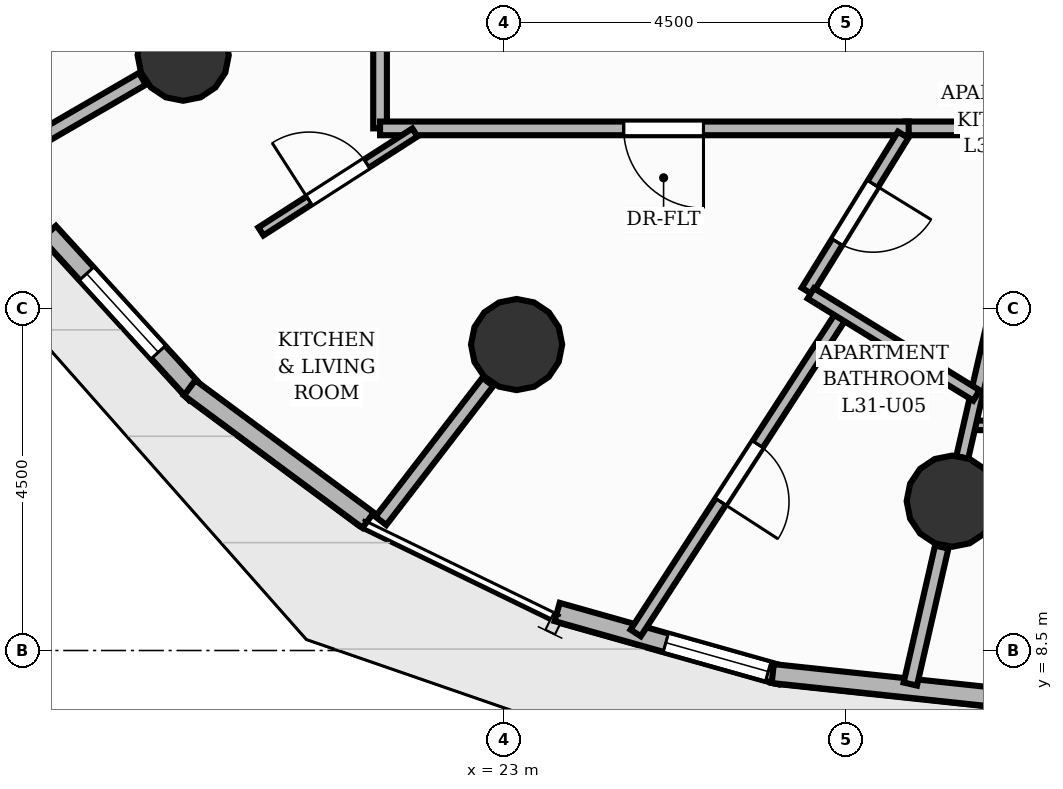
"""IFC4 building model, lengths in metres.
Left out: names, types, materials, properties, quantities, classifications, styles, units other than length and angle.
Written with IfcOpenShell. Run it as: python <this file> out.ifc"""

import sys

from ifc_helpers import new_model, si_unit, direction, frame, frame_2d, origin, origin_2d, place, context, subcontext, project, spatial, rectangle, circle, extrude, element, fill, save


model = new_model("IFC4")
c1 = context("Model", 3, precision=1e-05, world=origin(), true_north=direction((0.0, 1.0)))
c2 = subcontext(c1, "Body", "Model", "MODEL_VIEW")
j1 = project(units=[si_unit("LENGTHUNIT", "METRE"), si_unit("PLANEANGLEUNIT", "RADIAN")], contexts=[c1])
p1 = place(None, origin())
s1 = spatial("IfcSite", under=j1, at=p1, CompositionType="ELEMENT")
p2 = place(p1, origin())
s2 = spatial("IfcBuilding", under=s1, at=p2, CompositionType="ELEMENT")
p3 = place(p2, frame((0.0, 0.0, 106.08)))
s3 = spatial("IfcBuildingStorey", under=s2, at=p3, CompositionType="ELEMENT", Elevation=106.08)
for number, where, z_axis, x_axis in (
    (1, (18.78, 16.333, 0.0), (0.0, 0.0, 1.0), (1.0, 0.0, 0.0)),
    (2, (23.167, 12.526, 0.0), (0.0, 0.0, 1.0), (1.0, 0.0, 0.0)),
    (3, (28.898, 10.465, 0.0), (0.0, 0.0, 1.0), (1.0, 0.0, 0.0)),
):
    element("IfcColumn", number, at=place(p3, frame(where, z_axis=z_axis, x_axis=x_axis)), inside=s3, PredefinedType="COLUMN", context=c2, shape_type="SweptSolid", body=[
        extrude(circle(Radius=0.6, at=origin_2d()), origin(), (0.0, 0.0, 1.0), 3.2),
    ])
p4 = place(p3, frame((18.949, 11.879, 0.0), z_axis=(0.0, 0.0, 1.0), x_axis=(-0.673691100196, 0.739013059098, 0.0)))
e4 = element("IfcWall", 4, at=p4, inside=s3, PredefinedType="SOLIDWALL", context=c2, shape_type="SweptSolid", body=[
    extrude(rectangle(XDim=2.874, YDim=0.25, at=frame_2d((1.437, 0.0))), origin(), (0.0, 0.0, 1.0), 2.96),
])
p5 = place(p4, frame((0.737, 0.0, 0.85)))
e5 = element("IfcOpeningElement", 5, at=p5, cuts=e4, PredefinedType="OPENING", context=c2, shape_type="SweptSolid", body=[
    extrude(rectangle(XDim=1.4, YDim=1.55, at=frame_2d((0.7, 0.775))), frame((0.0, 0.135, 0.0), z_axis=(0.0, -1.0, 0.0), x_axis=(1.0, 0.0, 0.0)), (0.0, 0.0, 1.0), 0.27),
])
p6 = place(p3, frame((21.213, 10.215, 0.0), z_axis=(0.0, 0.0, 1.0), x_axis=(-0.803255279066, 0.595634918933, 0.0)))
e6 = element("IfcWall", 6, at=p6, inside=s3, PredefinedType="SOLIDWALL", context=c2, shape_type="SweptSolid", body=[
    extrude(rectangle(XDim=2.923, YDim=0.25, at=frame_2d((1.462, 0.0))), origin(), (0.0, 0.0, 1.0), 2.96),
])
p7 = place(p3, frame((26.646, 8.175, 0.0), z_axis=(0.0, 0.0, 1.0), x_axis=(-0.962391946781, 0.271664758059, 0.0)))
e7 = element("IfcWall", 7, at=p7, inside=s3, PredefinedType="SOLIDWALL", context=c2, shape_type="SweptSolid", body=[
    extrude(rectangle(XDim=3.061, YDim=0.25, at=frame_2d((1.531, 0.0))), origin(), (0.0, 0.0, 1.0), 2.96),
])
p8 = place(p7, frame((0.175, 0.0, 0.85)))
e8 = element("IfcOpeningElement", 8, at=p8, cuts=e7, PredefinedType="OPENING", context=c2, shape_type="SweptSolid", body=[
    extrude(rectangle(XDim=1.4, YDim=1.55, at=frame_2d((0.7, 0.775))), frame((0.0, 0.135, 0.0), z_axis=(0.0, -1.0, 0.0), x_axis=(1.0, 0.0, 0.0)), (0.0, 0.0, 1.0), 0.27),
])
p9 = place(p3, frame((29.65, 7.864, 0.0), z_axis=(0.0, 0.0, 1.0), x_axis=(-0.994353607356, 0.106117404502, 0.0)))
e9 = element("IfcWall", 9, at=p9, inside=s3, PredefinedType="SOLIDWALL", context=c2, shape_type="SweptSolid", body=[
    extrude(rectangle(XDim=3.131, YDim=0.25, at=frame_2d((1.565, 0.0))), origin(), (0.0, 0.0, 1.0), 2.96),
])
p10 = place(p3, frame((18.243, 16.022, 0.0), z_axis=(0.0, 0.0, 1.0), x_axis=(-0.865046864493, -0.501691062539, 0.0)))
e10 = element("IfcWall", 10, at=p10, inside=s3, PredefinedType="PARTITIONING", context=c2, shape_type="SweptSolid", body=[
    extrude(rectangle(XDim=2.028, YDim=0.18, at=frame_2d((1.014, 0.0))), origin(), (0.0, 0.0, 1.0), 2.26),
])
p11 = place(p3, frame((22.788, 12.034, 0.0), z_axis=(0.0, 0.0, 1.0), x_axis=(-0.610007255548, -0.792395827967, 0.0)))
e11 = element("IfcWall", 11, at=p11, inside=s3, PredefinedType="PARTITIONING", context=c2, shape_type="SweptSolid", body=[
    extrude(rectangle(XDim=2.308, YDim=0.18, at=frame_2d((1.154, 0.0))), origin(), (0.0, 0.0, 1.0), 2.26),
])
p12 = place(p3, frame((28.76, 9.861, 0.0), z_axis=(0.0, 0.0, 1.0), x_axis=(-0.2234127464, -0.974723932581, 0.0)))
e12 = element("IfcWall", 12, at=p12, inside=s3, PredefinedType="PARTITIONING", context=c2, shape_type="SweptSolid", body=[
    extrude(rectangle(XDim=1.849, YDim=0.18, at=frame_2d((0.924, 0.0))), origin(), (0.0, 0.0, 1.0), 2.26),
])
p13 = place(p3, frame((42.63, 15.37, 0.0), z_axis=(0.0, 0.0, 1.0), x_axis=(-1.0, 0.0, 0.0)))
e13 = element("IfcWall", 13, at=p13, inside=s3, PredefinedType="PARTITIONING", context=c2, shape_type="SweptSolid", body=[
    extrude(rectangle(XDim=14.346, YDim=0.18, at=frame_2d((7.173, 0.0))), origin(), (0.0, 0.0, 1.0), 2.955),
])
p14 = place(p13, frame((6.615, 0.0, 0.0)))
e14 = element("IfcOpeningElement", 14, at=p14, cuts=e13, PredefinedType="OPENING", context=c2, shape_type="SweptSolid", body=[
    extrude(rectangle(XDim=1.05, YDim=2.15, at=frame_2d((0.525, 1.075))), frame((0.0, 0.1, 0.0), z_axis=(0.0, -1.0, 0.0), x_axis=(1.0, 0.0, 0.0)), (0.0, 0.0, 1.0), 0.2),
])
p15 = place(p3, frame((21.37, 15.37, 0.0), z_axis=(0.0, 0.0, 1.0), x_axis=(0.0, 1.0, 0.0)))
e15 = element("IfcWall", 15, at=p15, inside=s3, PredefinedType="PARTITIONING", context=c2, shape_type="SweptSolid", body=[
    extrude(rectangle(XDim=17.26, YDim=0.18, at=frame_2d((8.63, 0.0))), origin(), (0.0, 0.0, 1.0), 2.955),
])
p16 = place(p15, frame((13.794, 0.0, 0.0)))
e16 = element("IfcOpeningElement", 16, at=p16, cuts=e15, PredefinedType="OPENING", context=c2, shape_type="SweptSolid", body=[
    extrude(rectangle(XDim=1.05, YDim=2.15, at=frame_2d((0.525, 1.075))), frame((0.0, 0.1, 0.0), z_axis=(0.0, -1.0, 0.0), x_axis=(1.0, 0.0, 0.0)), (0.0, 0.0, 1.0), 0.2),
])
p17 = place(p3, frame((28.325, 15.37, 0.0), z_axis=(0.0, 0.0, 1.0), x_axis=(-1.0, 0.0, 0.0)))
e17 = element("IfcWall", 17, at=p17, inside=s3, PredefinedType="PARTITIONING", context=c2, shape_type="SweptSolid", body=[
    extrude(rectangle(XDim=6.955, YDim=0.18, at=frame_2d((3.478, 0.0))), origin(), (0.0, 0.0, 1.0), 2.955),
])
p18 = place(p17, frame((2.7, 0.0, 0.0)))
e18 = element("IfcOpeningElement", 18, at=p18, cuts=e17, PredefinedType="OPENING", context=c2, shape_type="SweptSolid", body=[
    extrude(rectangle(XDim=1.05, YDim=2.15, at=frame_2d((0.525, 1.075))), frame((0.0, 0.1, 0.0), z_axis=(0.0, -1.0, 0.0), x_axis=(1.0, 0.0, 0.0)), (0.0, 0.0, 1.0), 0.2),
])
p19 = place(p3, frame((34.368, 11.384, 0.0), z_axis=(0.0, 0.0, 1.0), x_axis=(-0.999882579861, 0.015324049414, 0.0)))
e19 = element("IfcWall", 19, at=p19, inside=s3, PredefinedType="PARTITIONING", context=c2, shape_type="SweptSolid", body=[
    extrude(rectangle(XDim=5.242, YDim=0.125, at=frame_2d((2.621, 0.0))), origin(), (0.0, 0.0, 1.0), 2.955),
])
p20 = place(p19, frame((2.171, 0.0, 0.0)))
e20 = element("IfcOpeningElement", 20, at=p20, cuts=e19, PredefinedType="OPENING", context=c2, shape_type="SweptSolid", body=[
    extrude(rectangle(XDim=0.9, YDim=2.1, at=frame_2d((0.45, 1.05))), frame((0.0, 0.073, 0.0), z_axis=(0.0, -1.0, 0.0), x_axis=(1.0, 0.0, 0.0)), (0.0, 0.0, 1.0), 0.145),
])
p21 = place(p3, frame((29.03, 11.041, 0.0), z_axis=(0.0, 0.0, 1.0), x_axis=(0.223478419757, 0.974708877513, 0.0)))
e21 = element("IfcWall", 21, at=p21, inside=s3, PredefinedType="PLUMBINGWALL", context=c2, shape_type="SweptSolid", body=[
    extrude(rectangle(XDim=4.442, YDim=0.16, at=frame_2d((2.221, 0.0))), origin(), (0.0, 0.0, 1.0), 2.26),
])
p22 = place(p3, frame((27.458, 12.94, 0.0), z_axis=(0.0, 0.0, 1.0), x_axis=(-0.543424886613, -0.839457796801, 0.0)))
e22 = element("IfcWall", 22, at=p22, inside=s3, PredefinedType="PLUMBINGWALL", context=c2, shape_type="SweptSolid", body=[
    extrude(rectangle(XDim=5.014, YDim=0.16, at=frame_2d((2.507, 0.0))), origin(), (0.0, 0.0, 1.0), 2.641),
])
p23 = place(p22, frame((2.057, 0.0, 0.0)))
e23 = element("IfcOpeningElement", 23, at=p23, cuts=e22, PredefinedType="OPENING", context=c2, shape_type="SweptSolid", body=[
    extrude(rectangle(XDim=0.9, YDim=2.1, at=frame_2d((0.45, 1.05))), frame((0.0, 0.09, 0.0), z_axis=(0.0, -1.0, 0.0), x_axis=(1.0, 0.0, 0.0)), (0.0, 0.0, 1.0), 0.18),
])
p24 = place(p3, frame((19.802, 14.014, 0.0), z_axis=(0.0, 0.0, 1.0), x_axis=(0.841349696578, 0.540491154477, 0.0)))
e24 = element("IfcWall", 24, at=p24, inside=s3, PredefinedType="PARTITIONING", context=c2, shape_type="SweptSolid", body=[
    extrude(rectangle(XDim=2.408, YDim=0.125, at=frame_2d((1.204, 0.0))), origin(), (0.0, 0.0, 1.0), 2.955),
])
p25 = place(p24, frame((0.754, 0.0, 0.0)))
e25 = element("IfcOpeningElement", 25, at=p25, cuts=e24, PredefinedType="OPENING", context=c2, shape_type="SweptSolid", body=[
    extrude(rectangle(XDim=0.9, YDim=2.1, at=frame_2d((0.45, 1.05))), frame((0.0, 0.073, 0.0), z_axis=(0.0, -1.0, 0.0), x_axis=(1.0, 0.0, 0.0)), (0.0, 0.0, 1.0), 0.145),
])
p26 = place(p3, frame((28.253, 15.285, 0.0), z_axis=(0.0, 0.0, 1.0), x_axis=(-0.524605293124, -0.851345574033, 0.0)))
e26 = element("IfcWall", 26, at=p26, inside=s3, PredefinedType="PLUMBINGWALL", context=c2, shape_type="SweptSolid", body=[
    extrude(rectangle(XDim=2.414, YDim=0.16, at=frame_2d((1.207, 0.0))), origin(), (0.0, 0.0, 1.0), 2.955),
])
p27 = place(p26, frame((0.757, 0.0, 0.0)))
e27 = element("IfcOpeningElement", 27, at=p27, cuts=e26, PredefinedType="OPENING", context=c2, shape_type="SweptSolid", body=[
    extrude(rectangle(XDim=0.9, YDim=2.1, at=frame_2d((0.45, 1.05))), frame((0.0, 0.09, 0.0), z_axis=(0.0, -1.0, 0.0), x_axis=(1.0, 0.0, 0.0)), (0.0, 0.0, 1.0), 0.18),
])
p28 = place(p3, frame((27.038, 13.199, 0.0), z_axis=(0.0, 0.0, 1.0), x_axis=(0.851314293413, -0.524656052887, 0.0)))
e28 = element("IfcWall", 28, at=p28, inside=s3, PredefinedType="PLUMBINGWALL", context=c2, shape_type="SweptSolid", body=[
    extrude(rectangle(XDim=2.56, YDim=0.16, at=frame_2d((1.28, 0.0))), origin(), (0.0, 0.0, 1.0), 2.955),
])
p29 = place(p5, origin())
e29 = element("IfcWindow", 29, at=p29, inside=s3, PartitioningType="SINGLE_PANEL", PredefinedType="WINDOW", context=c2, shape_type="SweptSolid", body=[
    extrude(rectangle(XDim=1.4, YDim=1.55, at=frame_2d((0.7, 0.775))), frame((0.0, 0.03, 0.0), z_axis=(0.0, -1.0, 0.0), x_axis=(1.0, 0.0, 0.0)), (0.0, 0.0, 1.0), 0.06),
])
fill(e5, e29)
p30 = place(p8, origin())
e30 = element("IfcWindow", 30, at=p30, inside=s3, PartitioningType="SINGLE_PANEL", PredefinedType="WINDOW", context=c2, shape_type="SweptSolid", body=[
    extrude(rectangle(XDim=1.4, YDim=1.55, at=frame_2d((0.7, 0.775))), frame((0.0, 0.03, 0.0), z_axis=(0.0, -1.0, 0.0), x_axis=(1.0, 0.0, 0.0)), (0.0, 0.0, 1.0), 0.06),
])
fill(e8, e30)
p31 = place(p18, origin())
e31 = element("IfcDoor", 31, at=p31, inside=s3, OperationType="SINGLE_SWING_LEFT", PredefinedType="DOOR", context=c2, shape_type="SweptSolid", body=[
    extrude(rectangle(XDim=1.05, YDim=2.15, at=frame_2d((0.525, 1.075))), frame((0.0, 0.025, 0.0), z_axis=(0.0, -1.0, 0.0), x_axis=(1.0, 0.0, 0.0)), (0.0, 0.0, 1.0), 0.05),
])
fill(e18, e31)
p32 = place(p23, origin())
e32 = element("IfcDoor", 32, at=p32, inside=s3, OperationType="SINGLE_SWING_RIGHT", PredefinedType="DOOR", context=c2, shape_type="SweptSolid", body=[
    extrude(rectangle(XDim=0.9, YDim=2.1, at=frame_2d((0.45, 1.05))), frame((0.0, 0.025, 0.0), z_axis=(0.0, -1.0, 0.0), x_axis=(1.0, 0.0, 0.0)), (0.0, 0.0, 1.0), 0.05),
])
fill(e23, e32)
p33 = place(p25, origin())
e33 = element("IfcDoor", 33, at=p33, inside=s3, OperationType="SINGLE_SWING_LEFT", PredefinedType="DOOR", context=c2, shape_type="SweptSolid", body=[
    extrude(rectangle(XDim=0.9, YDim=2.1, at=frame_2d((0.45, 1.05))), frame((0.0, 0.025, 0.0), z_axis=(0.0, -1.0, 0.0), x_axis=(1.0, 0.0, 0.0)), (0.0, 0.0, 1.0), 0.05),
])
fill(e25, e33)
p34 = place(p27, origin())
e34 = element("IfcDoor", 34, at=p34, inside=s3, OperationType="SINGLE_SWING_LEFT", PredefinedType="DOOR", context=c2, shape_type="SweptSolid", body=[
    extrude(rectangle(XDim=0.9, YDim=2.1, at=frame_2d((0.45, 1.05))), frame((0.0, 0.025, 0.0), z_axis=(0.0, -1.0, 0.0), x_axis=(1.0, 0.0, 0.0)), (0.0, 0.0, 1.0), 0.05),
])
fill(e27, e34)
save(model, sys.argv[1])
